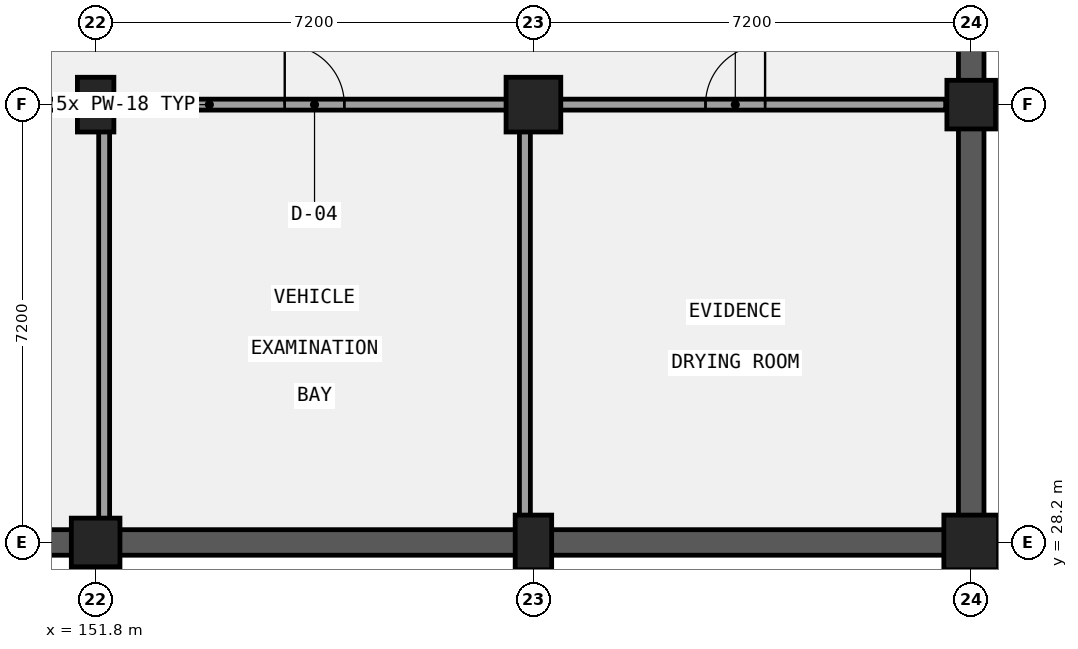
"""IFC4 building model, lengths in metres.
Left out: names, types, materials, properties, quantities, classifications, styles, units other than length and angle.
Written with IfcOpenShell. Run it as: python <this file> out.ifc"""

import sys

from ifc_helpers import new_model, si_unit, direction, frame, frame_2d, origin, origin_2d, place, context, subcontext, project, spatial, rectangle, extrude, element, fill, save


model = new_model("IFC4")
c1 = context("Model", 3, precision=1e-05, world=origin(), true_north=direction((0.0, 1.0)))
c2 = subcontext(c1, "Body", "Model", "MODEL_VIEW")
j1 = project(units=[si_unit("LENGTHUNIT", "METRE"), si_unit("PLANEANGLEUNIT", "RADIAN")], contexts=[c1])
p1 = place(None, origin())
s1 = spatial("IfcSite", under=j1, at=p1, CompositionType="ELEMENT")
p2 = place(p1, origin())
s2 = spatial("IfcBuilding", under=s1, at=p2, CompositionType="ELEMENT")
p3 = place(p2, frame((0.0, 0.0, -4.2)))
s3 = spatial("IfcBuildingStorey", under=s2, at=p3, CompositionType="ELEMENT", Elevation=-4.2)
p4 = place(p3, frame((166.2, 42.37, 0.0), z_axis=(0.0, 0.0, 1.0), x_axis=(0.0, -1.0, 0.0)))
e1 = element("IfcWall", 1, at=p4, inside=s3, PredefinedType="USERDEFINED", context=c2, shape_type="SweptSolid", body=[
    extrude(rectangle(XDim=13.97, YDim=0.42, at=frame_2d((6.985, 0.0))), origin(), (0.0, 0.0, 1.0), 3.08),
])
p5 = place(p3, frame((166.41, 28.2, 0.0), z_axis=(0.0, 0.0, 1.0), x_axis=(-1.0, 0.0, 0.0)))
e2 = element("IfcWall", 2, at=p5, inside=s3, PredefinedType="USERDEFINED", context=c2, shape_type="SweptSolid", body=[
    extrude(rectangle(XDim=22.02, YDim=0.42, at=frame_2d((11.01, 0.0))), origin(), (0.0, 0.0, 1.0), 2.88),
])
p6 = place(p3, frame((151.8, 28.2, 0.0), z_axis=(0.0, 0.0, 1.0), x_axis=(1.0, 0.0, 0.0)))
e3 = element("IfcColumn", 3, at=p6, inside=s3, PredefinedType="COLUMN", context=c2, shape_type="SweptSolid", body=[
    extrude(rectangle(XDim=0.8, YDim=0.8, at=origin_2d()), origin(), (0.0, 0.0, 1.0), 4.2),
])
for number, where, z_axis, x_axis in (
    (4, (151.8, 35.4, 0.0), (0.0, 0.0, 1.0), (1.0, 0.0, 0.0)),
    (5, (159.0, 28.2, 0.0), (0.0, 0.0, 1.0), (1.0, 0.0, 0.0)),
):
    element("IfcColumn", number, at=place(p3, frame(where, z_axis=z_axis, x_axis=x_axis)), inside=s3, PredefinedType="COLUMN", context=c2, shape_type="SweptSolid", body=[
        extrude(rectangle(XDim=0.6, YDim=0.9, at=origin_2d()), origin(), (0.0, 0.0, 1.0), 4.2),
    ])
for number, where, z_axis, x_axis in (
    (6, (159.0, 35.4, 0.0), (0.0, 0.0, 1.0), (1.0, 0.0, 0.0)),
    (7, (166.2, 28.2, 0.0), (0.0, 0.0, 1.0), (1.0, 0.0, 0.0)),
):
    element("IfcColumn", number, at=place(p3, frame(where, z_axis=z_axis, x_axis=x_axis)), inside=s3, PredefinedType="COLUMN", context=c2, shape_type="SweptSolid", body=[
        extrude(rectangle(XDim=0.9, YDim=0.9, at=origin_2d()), origin(), (0.0, 0.0, 1.0), 4.2),
    ])
p7 = place(p3, frame((166.2, 35.4, 0.0), z_axis=(0.0, 0.0, 1.0), x_axis=(1.0, 0.0, 0.0)))
e8 = element("IfcColumn", 8, at=p7, inside=s3, PredefinedType="COLUMN", context=c2, shape_type="SweptSolid", body=[
    extrude(rectangle(XDim=0.8, YDim=0.8, at=origin_2d()), origin(), (0.0, 0.0, 1.0), 4.2),
])
p8 = place(p3, frame((145.02, 35.4, 0.0), z_axis=(0.0, 0.0, 1.0), x_axis=(1.0, 0.0, 0.0)))
e9 = element("IfcWall", 9, at=p8, inside=s3, PredefinedType="PARTITIONING", context=c2, shape_type="SweptSolid", body=[
    extrude(rectangle(XDim=6.92, YDim=0.18, at=frame_2d((3.46, 0.0))), origin(), (0.0, 0.0, 1.0), 2.88),
])
p9 = place(p8, frame((3.0, 0.0, 0.0)))
e10 = element("IfcOpeningElement", 10, at=p9, cuts=e9, PredefinedType="OPENING", context=c2, shape_type="SweptSolid", body=[
    extrude(rectangle(XDim=0.92, YDim=2.35, at=frame_2d((0.46, 1.175))), frame((0.0, 0.1, 0.0), z_axis=(0.0, -1.0, 0.0), x_axis=(1.0, 0.0, 0.0)), (0.0, 0.0, 1.0), 0.2),
])
p10 = place(p3, frame((151.94, 28.38, 0.0), z_axis=(0.0, 0.0, 1.0), x_axis=(0.0, 1.0, 0.0)))
e11 = element("IfcWall", 11, at=p10, inside=s3, PredefinedType="PARTITIONING", context=c2, shape_type="SweptSolid", body=[
    extrude(rectangle(XDim=7.02, YDim=0.18, at=frame_2d((3.51, 0.0))), origin(), (0.0, 0.0, 1.0), 3.23),
])
p11 = place(p3, frame((151.94, 35.4, 0.0), z_axis=(0.0, 0.0, 1.0), x_axis=(1.0, 0.0, 0.0)))
e12 = element("IfcWall", 12, at=p11, inside=s3, PredefinedType="PARTITIONING", context=c2, shape_type="SweptSolid", body=[
    extrude(rectangle(XDim=6.92, YDim=0.18, at=frame_2d((3.46, 0.0))), origin(), (0.0, 0.0, 1.0), 3.33),
])
p12 = place(p11, frame((2.97, 0.0, 0.0)))
e13 = element("IfcOpeningElement", 13, at=p12, cuts=e12, PredefinedType="OPENING", context=c2, shape_type="SweptSolid", body=[
    extrude(rectangle(XDim=0.98, YDim=2.1, at=frame_2d((0.49, 1.05))), frame((0.0, 0.1, 0.0), z_axis=(0.0, -1.0, 0.0), x_axis=(1.0, 0.0, 0.0)), (0.0, 0.0, 1.0), 0.2),
])
p13 = place(p3, frame((158.86, 28.38, 0.0), z_axis=(0.0, 0.0, 1.0), x_axis=(0.0, 1.0, 0.0)))
e14 = element("IfcWall", 14, at=p13, inside=s3, PredefinedType="PARTITIONING", context=c2, shape_type="SweptSolid", body=[
    extrude(rectangle(XDim=7.02, YDim=0.18, at=frame_2d((3.51, 0.0))), origin(), (0.0, 0.0, 1.0), 3.13),
])
p14 = place(p3, frame((158.86, 35.4, 0.0), z_axis=(0.0, 0.0, 1.0), x_axis=(1.0, 0.0, 0.0)))
e15 = element("IfcWall", 15, at=p14, inside=s3, PredefinedType="PARTITIONING", context=c2, shape_type="SweptSolid", body=[
    extrude(rectangle(XDim=6.92, YDim=0.18, at=frame_2d((3.46, 0.0))), origin(), (0.0, 0.0, 1.0), 3.28),
])
p15 = place(p14, frame((2.97, 0.0, 0.0)))
e16 = element("IfcOpeningElement", 16, at=p15, cuts=e15, PredefinedType="OPENING", context=c2, shape_type="SweptSolid", body=[
    extrude(rectangle(XDim=0.98, YDim=2.22, at=frame_2d((0.49, 1.11))), frame((0.0, 0.1, 0.0), z_axis=(0.0, -1.0, 0.0), x_axis=(1.0, 0.0, 0.0)), (0.0, 0.0, 1.0), 0.2),
])
p16 = place(p12, frame((0.98, 0.0, 0.0), z_axis=(0.0, 0.0, 1.0), x_axis=(-1.0, 0.0, 0.0)))
e17 = element("IfcDoor", 17, at=p16, inside=s3, OperationType="SINGLE_SWING_LEFT", PredefinedType="DOOR", context=c2, shape_type="SweptSolid", body=[
    extrude(rectangle(XDim=0.98, YDim=2.1, at=frame_2d((0.49, 1.05))), frame((0.0, 0.025, 0.0), z_axis=(0.0, -1.0, 0.0), x_axis=(1.0, 0.0, 0.0)), (0.0, 0.0, 1.0), 0.05),
])
fill(e13, e17)
p17 = place(p15, frame((0.98, 0.0, 0.0), z_axis=(0.0, 0.0, 1.0), x_axis=(-1.0, 0.0, 0.0)))
e18 = element("IfcDoor", 18, at=p17, inside=s3, OperationType="SINGLE_SWING_RIGHT", PredefinedType="DOOR", context=c2, shape_type="SweptSolid", body=[
    extrude(rectangle(XDim=0.98, YDim=2.22, at=frame_2d((0.49, 1.11))), frame((0.0, 0.025, 0.0), z_axis=(0.0, -1.0, 0.0), x_axis=(1.0, 0.0, 0.0)), (0.0, 0.0, 1.0), 0.05),
])
fill(e16, e18)
save(model, sys.argv[1])
